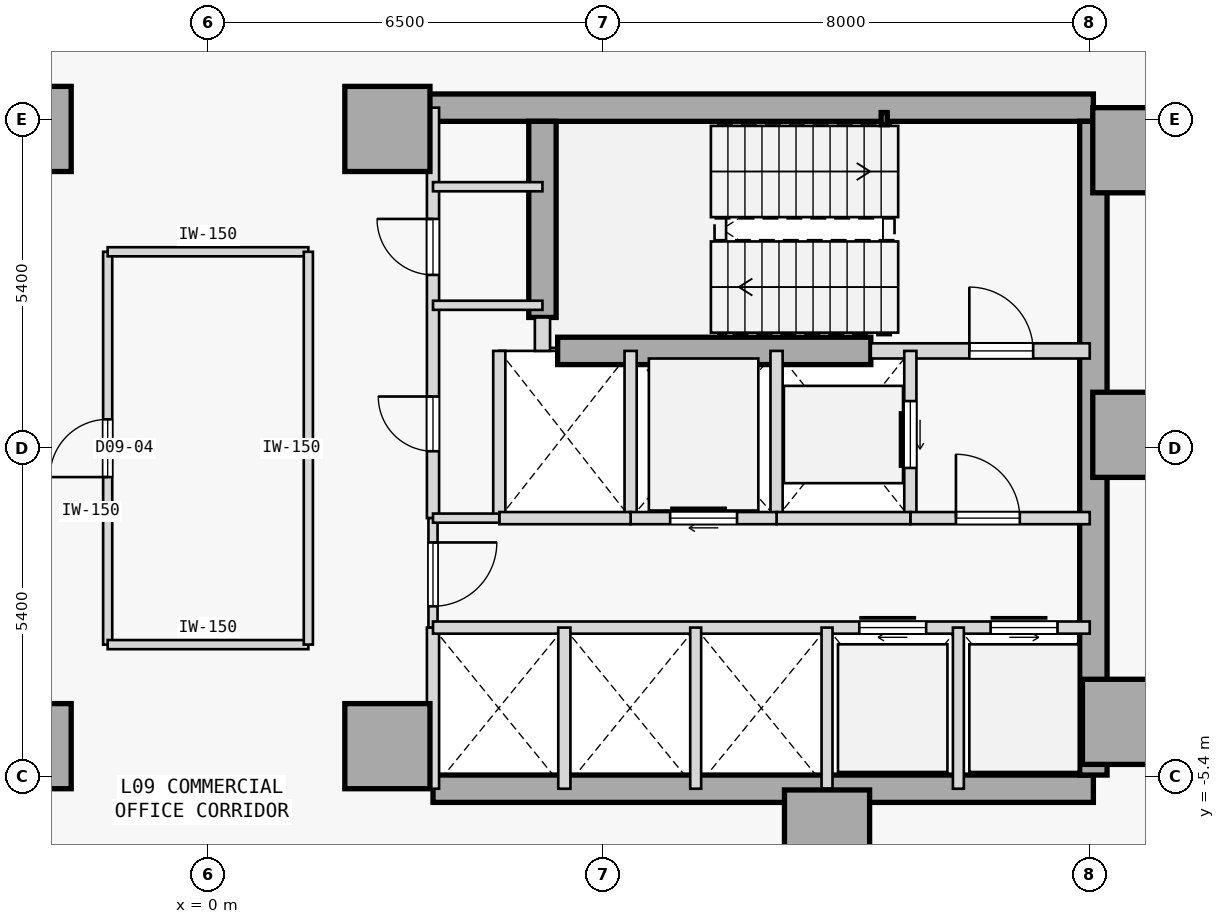
"""IFC4 building model, lengths in metres.
Left out: names, types, materials, properties, quantities, classifications, styles, units other than length and angle.
Written with IfcOpenShell. Run it as: python <this file> out.ifc"""

import sys

from ifc_helpers import new_model, si_unit, direction, frame, frame_2d, origin, origin_2d, place, context, subcontext, project, spatial, rectangle, hollow_rectangle, extrude, element, fill, save


model = new_model("IFC4")
c1 = context("Model", 3, precision=1e-05, world=origin(), true_north=direction((0.0, 1.0)))
c2 = subcontext(c1, "Body", "Model", "MODEL_VIEW")
j1 = project(units=[si_unit("LENGTHUNIT", "METRE"), si_unit("PLANEANGLEUNIT", "RADIAN")], contexts=[c1])
p1 = place(None, origin())
s1 = spatial("IfcSite", under=j1, at=p1, CompositionType="ELEMENT")
p2 = place(p1, origin())
s2 = spatial("IfcBuilding", under=s1, at=p2, CompositionType="ELEMENT")
p3 = place(p2, frame((0.0, 0.0, 40.8)))
s3 = spatial("IfcBuildingStorey", under=s2, at=p3, CompositionType="ELEMENT", Elevation=40.8)
for number, where, z_axis, x_axis in (
    (1, (-2.95, -4.9, 0.0), (0.0, 0.0, 1.0), (1.0, 0.0, 0.0)),
    (2, (-2.95, 5.25, 0.0), (0.0, 0.0, 1.0), (1.0, 0.0, 0.0)),
    (3, (15.25, 4.9, 0.0), (0.0, 0.0, 1.0), (1.0, 0.0, 0.0)),
    (4, (15.25, 0.22, 0.0), (0.0, 0.0, 1.0), (1.0, 0.0, 0.0)),
    (5, (15.08, -4.5, 0.0), (0.0, 0.0, 1.0), (1.0, 0.0, 0.0)),
    (6, (10.18, -6.32, 0.0), (0.0, 0.0, 1.0), (1.0, 0.0, 0.0)),
    (7, (2.95, -4.9, 0.0), (0.0, 0.0, 1.0), (1.0, 0.0, 0.0)),
    (8, (2.95, 5.25, 0.0), (0.0, 0.0, 1.0), (1.0, 0.0, 0.0)),
):
    element("IfcColumn", number, at=place(p3, frame(where, z_axis=z_axis, x_axis=x_axis)), inside=s3, PredefinedType="COLUMN", context=c2, shape_type="SweptSolid", body=[
        extrude(rectangle(XDim=1.4, YDim=1.4, at=origin_2d()), origin(), (0.0, 0.0, 1.0), 3.8),
    ])
p4 = place(p3, frame((3.15, 5.6, 0.0), z_axis=(0.0, 0.0, 1.0), x_axis=(1.0, 0.0, 0.0)))
e9 = element("IfcWall", 9, at=p4, inside=s3, PredefinedType="SHEAR", context=c2, shape_type="SweptSolid", body=[
    extrude(rectangle(XDim=11.41, YDim=0.45, at=frame_2d((5.705, 0.0))), origin(), (0.0, 0.0, 1.0), 3.575),
])
p5 = place(p3, frame((3.7, -5.6, 0.0), z_axis=(0.0, 0.0, 1.0), x_axis=(1.0, 0.0, 0.0)))
e10 = element("IfcWall", 10, at=p5, inside=s3, PredefinedType="SHEAR", context=c2, shape_type="SweptSolid", body=[
    extrude(rectangle(XDim=10.86, YDim=0.45, at=frame_2d((5.43, 0.0))), origin(), (0.0, 0.0, 1.0), 3.575),
])
p6 = place(p3, frame((14.56, -5.375, 0.0), z_axis=(0.0, 0.0, 1.0), x_axis=(0.0, 1.0, 0.0)))
e11 = element("IfcWall", 11, at=p6, inside=s3, PredefinedType="SHEAR", context=c2, shape_type="SweptSolid", body=[
    extrude(rectangle(XDim=10.75, YDim=0.45, at=frame_2d((5.375, 0.0))), origin(), (0.0, 0.0, 1.0), 3.575),
])
p7 = place(p3, frame((5.5, 2.15, 0.0), z_axis=(0.0, 0.0, 1.0), x_axis=(0.0, 1.0, 0.0)))
e12 = element("IfcWall", 12, at=p7, inside=s3, PredefinedType="SHEAR", context=c2, shape_type="SweptSolid", body=[
    extrude(rectangle(XDim=3.225, YDim=0.45, at=frame_2d((1.613, 0.0))), origin(), (0.0, 0.0, 1.0), 3.575),
])
p8 = place(p3, frame((5.75, 1.6, 0.0), z_axis=(0.0, 0.0, 1.0), x_axis=(1.0, 0.0, 0.0)))
e13 = element("IfcWall", 13, at=p8, inside=s3, PredefinedType="SHEAR", context=c2, shape_type="SweptSolid", body=[
    extrude(rectangle(XDim=5.15, YDim=0.45, at=frame_2d((2.575, 0.0))), origin(), (0.0, 0.0, 1.0), 3.575),
])
p9 = place(p3, frame((11.12, 5.42, 0.0), z_axis=(0.0, 0.0, 1.0), x_axis=(1.0, 0.0, 0.0)))
e14 = element("IfcColumn", 14, at=p9, inside=s3, PredefinedType="COLUMN", context=c2, shape_type="SweptSolid", body=[
    extrude(hollow_rectangle(XDim=0.1, YDim=0.2, WallThickness=0.008, at=origin_2d()), origin(), (0.0, 0.0, 1.0), 3.8),
])
p10 = place(p3, frame((10.9, 1.6, 0.0), z_axis=(0.0, 0.0, 1.0), x_axis=(1.0, 0.0, 0.0)))
e15 = element("IfcWall", 15, at=p10, inside=s3, PredefinedType="STANDARD", context=c2, shape_type="SweptSolid", body=[
    extrude(rectangle(XDim=3.6, YDim=0.25, at=frame_2d((1.8, 0.0))), origin(), (0.0, 0.0, 1.0), 3.575),
])
p11 = place(p10, frame((1.62, 0.0, 0.0)))
e16 = element("IfcOpeningElement", 16, at=p11, cuts=e15, PredefinedType="OPENING", context=c2, shape_type="SweptSolid", body=[
    extrude(rectangle(XDim=1.05, YDim=2.15, at=frame_2d((0.525, 1.075))), frame((0.0, 0.135, 0.0), z_axis=(0.0, -1.0, 0.0), x_axis=(1.0, 0.0, 0.0)), (0.0, 0.0, 1.0), 0.27),
])
p12 = place(p3, frame((5.5, 1.6, 0.0), z_axis=(0.0, 0.0, 1.0), x_axis=(0.0, 1.0, 0.0)))
e17 = element("IfcWall", 17, at=p12, inside=s3, PredefinedType="STANDARD", context=c2, shape_type="SweptSolid", body=[
    extrude(rectangle(XDim=0.55, YDim=0.25, at=frame_2d((0.275, 0.0))), origin(), (0.0, 0.0, 1.0), 3.575),
])
p13 = place(p3, frame((3.7, -1.15, 0.0), z_axis=(0.0, 0.0, 1.0), x_axis=(0.0, 1.0, 0.0)))
e18 = element("IfcWall", 18, at=p13, inside=s3, PredefinedType="STANDARD", context=c2, shape_type="SweptSolid", body=[
    extrude(rectangle(XDim=6.75, YDim=0.2, at=frame_2d((3.375, 0.0))), origin(), (0.0, 0.0, 1.0), 3.575),
])
p14 = place(p13, frame((1.1, 0.0, 0.0)))
e19 = element("IfcOpeningElement", 19, at=p14, cuts=e18, PredefinedType="OPENING", context=c2, shape_type="SweptSolid", body=[
    extrude(rectangle(XDim=0.9, YDim=2.15, at=frame_2d((0.45, 1.075))), frame((0.0, 0.11, 0.0), z_axis=(0.0, -1.0, 0.0), x_axis=(1.0, 0.0, 0.0)), (0.0, 0.0, 1.0), 0.22),
])
p15 = place(p13, frame((4.0, 0.0, 0.0)))
e20 = element("IfcOpeningElement", 20, at=p15, cuts=e18, PredefinedType="OPENING", context=c2, shape_type="SweptSolid", body=[
    extrude(rectangle(XDim=0.92, YDim=2.15, at=frame_2d((0.46, 1.075))), frame((0.0, 0.11, 0.0), z_axis=(0.0, -1.0, 0.0), x_axis=(1.0, 0.0, 0.0)), (0.0, 0.0, 1.0), 0.22),
])
p16 = place(p3, frame((3.7, -2.95, 0.0), z_axis=(0.0, 0.0, 1.0), x_axis=(0.0, 1.0, 0.0)))
e21 = element("IfcWall", 21, at=p16, inside=s3, PredefinedType="PARTITIONING", context=c2, shape_type="SweptSolid", body=[
    extrude(rectangle(XDim=1.8, YDim=0.15, at=frame_2d((0.9, 0.0))), origin(), (0.0, 0.0, 1.0), 3.575),
])
p17 = place(p16, frame((0.35, 0.0, 0.0)))
e22 = element("IfcOpeningElement", 22, at=p17, cuts=e21, PredefinedType="OPENING", context=c2, shape_type="SweptSolid", body=[
    extrude(rectangle(XDim=1.05, YDim=2.18, at=frame_2d((0.525, 1.09))), frame((0.0, 0.085, 0.0), z_axis=(0.0, -1.0, 0.0), x_axis=(1.0, 0.0, 0.0)), (0.0, 0.0, 1.0), 0.17),
])
p18 = place(p3, frame((3.7, -5.6, 0.0), z_axis=(0.0, 0.0, 1.0), x_axis=(0.0, 1.0, 0.0)))
e23 = element("IfcWall", 23, at=p18, inside=s3, PredefinedType="STANDARD", context=c2, shape_type="SweptSolid", body=[
    extrude(rectangle(XDim=2.65, YDim=0.2, at=frame_2d((1.325, 0.0))), origin(), (0.0, 0.0, 1.0), 3.575),
])
p19 = place(p3, frame((11.55, -1.15, 0.0), z_axis=(0.0, 0.0, 1.0), x_axis=(0.0, 1.0, 0.0)))
e24 = element("IfcWall", 24, at=p19, inside=s3, PredefinedType="STANDARD", context=c2, shape_type="SweptSolid", body=[
    extrude(rectangle(XDim=2.75, YDim=0.2, at=frame_2d((1.375, 0.0))), origin(), (0.0, 0.0, 1.0), 3.575),
])
p20 = place(p19, frame((0.825, 0.0, 0.0)))
e25 = element("IfcOpeningElement", 25, at=p20, cuts=e24, PredefinedType="OPENING", context=c2, shape_type="SweptSolid", body=[
    extrude(rectangle(XDim=1.1, YDim=2.15, at=frame_2d((0.55, 1.075))), frame((0.0, 0.11, 0.0), z_axis=(0.0, -1.0, 0.0), x_axis=(1.0, 0.0, 0.0)), (0.0, 0.0, 1.0), 0.22),
])
p21 = place(p3, frame((9.35, -1.15, 0.0), z_axis=(0.0, 0.0, 1.0), x_axis=(0.0, 1.0, 0.0)))
e26 = element("IfcWall", 26, at=p21, inside=s3, PredefinedType="STANDARD", context=c2, shape_type="SweptSolid", body=[
    extrude(rectangle(XDim=2.75, YDim=0.2, at=frame_2d((1.375, 0.0))), origin(), (0.0, 0.0, 1.0), 3.575),
])
p22 = place(p3, frame((11.55, -1.15, 0.0), z_axis=(0.0, 0.0, 1.0), x_axis=(1.0, 0.0, 0.0)))
e27 = element("IfcWall", 27, at=p22, inside=s3, PredefinedType="STANDARD", context=c2, shape_type="SweptSolid", body=[
    extrude(rectangle(XDim=2.95, YDim=0.2, at=frame_2d((1.475, 0.0))), origin(), (0.0, 0.0, 1.0), 3.575),
])
p23 = place(p22, frame((0.75, 0.0, 0.0)))
e28 = element("IfcOpeningElement", 28, at=p23, cuts=e27, PredefinedType="OPENING", context=c2, shape_type="SweptSolid", body=[
    extrude(rectangle(XDim=1.05, YDim=2.18, at=frame_2d((0.525, 1.09))), frame((0.0, 0.11, 0.0), z_axis=(0.0, -1.0, 0.0), x_axis=(1.0, 0.0, 0.0)), (0.0, 0.0, 1.0), 0.22),
])
p24 = place(p3, frame((9.35, -1.15, 0.0), z_axis=(0.0, 0.0, 1.0), x_axis=(1.0, 0.0, 0.0)))
e29 = element("IfcWall", 29, at=p24, inside=s3, PredefinedType="STANDARD", context=c2, shape_type="SweptSolid", body=[
    extrude(rectangle(XDim=2.2, YDim=0.2, at=frame_2d((1.1, 0.0))), origin(), (0.0, 0.0, 1.0), 3.575),
])
p25 = place(p3, frame((6.95, -1.15, 0.0), z_axis=(0.0, 0.0, 1.0), x_axis=(0.0, 1.0, 0.0)))
e30 = element("IfcWall", 30, at=p25, inside=s3, PredefinedType="STANDARD", context=c2, shape_type="SweptSolid", body=[
    extrude(rectangle(XDim=2.75, YDim=0.2, at=frame_2d((1.375, 0.0))), origin(), (0.0, 0.0, 1.0), 3.575),
])
p26 = place(p3, frame((6.95, -1.15, 0.0), z_axis=(0.0, 0.0, 1.0), x_axis=(1.0, 0.0, 0.0)))
e31 = element("IfcWall", 31, at=p26, inside=s3, PredefinedType="STANDARD", context=c2, shape_type="SweptSolid", body=[
    extrude(rectangle(XDim=2.4, YDim=0.2, at=frame_2d((1.2, 0.0))), origin(), (0.0, 0.0, 1.0), 3.575),
])
p27 = place(p26, frame((0.65, 0.0, 0.0)))
e32 = element("IfcOpeningElement", 32, at=p27, cuts=e31, PredefinedType="OPENING", context=c2, shape_type="SweptSolid", body=[
    extrude(rectangle(XDim=1.1, YDim=2.15, at=frame_2d((0.55, 1.075))), frame((0.0, 0.11, 0.0), z_axis=(0.0, -1.0, 0.0), x_axis=(1.0, 0.0, 0.0)), (0.0, 0.0, 1.0), 0.22),
])
p28 = place(p3, frame((4.79, -1.15, 0.0), z_axis=(0.0, 0.0, 1.0), x_axis=(0.0, 1.0, 0.0)))
e33 = element("IfcWall", 33, at=p28, inside=s3, PredefinedType="STANDARD", context=c2, shape_type="SweptSolid", body=[
    extrude(rectangle(XDim=2.75, YDim=0.2, at=frame_2d((1.375, 0.0))), origin(), (0.0, 0.0, 1.0), 3.575),
])
p29 = place(p3, frame((4.79, -1.15, 0.0), z_axis=(0.0, 0.0, 1.0), x_axis=(1.0, 0.0, 0.0)))
e34 = element("IfcWall", 34, at=p29, inside=s3, PredefinedType="STANDARD", context=c2, shape_type="SweptSolid", body=[
    extrude(rectangle(XDim=2.16, YDim=0.2, at=frame_2d((1.08, 0.0))), origin(), (0.0, 0.0, 1.0), 3.575),
])
p30 = place(p3, frame((3.7, -1.15, 0.0), z_axis=(0.0, 0.0, 1.0), x_axis=(1.0, 0.0, 0.0)))
e35 = element("IfcWall", 35, at=p30, inside=s3, PredefinedType="PARTITIONING", context=c2, shape_type="SweptSolid", body=[
    extrude(rectangle(XDim=1.09, YDim=0.15, at=frame_2d((0.545, 0.0))), origin(), (0.0, 0.0, 1.0), 3.575),
])
p31 = place(p3, frame((3.7, -2.95, 0.0), z_axis=(0.0, 0.0, 1.0), x_axis=(1.0, 0.0, 0.0)))
e36 = element("IfcWall", 36, at=p31, inside=s3, PredefinedType="STANDARD", context=c2, shape_type="SweptSolid", body=[
    extrude(rectangle(XDim=10.8, YDim=0.2, at=frame_2d((5.4, 0.0))), origin(), (0.0, 0.0, 1.0), 3.575),
])
p32 = place(p31, frame((7.01, 0.0, 0.0)))
e37 = element("IfcOpeningElement", 37, at=p32, cuts=e36, PredefinedType="OPENING", context=c2, shape_type="SweptSolid", body=[
    extrude(rectangle(XDim=1.1, YDim=2.15, at=frame_2d((0.55, 1.075))), frame((0.0, 0.11, 0.0), z_axis=(0.0, -1.0, 0.0), x_axis=(1.0, 0.0, 0.0)), (0.0, 0.0, 1.0), 0.22),
])
p33 = place(p31, frame((9.17, 0.0, 0.0)))
e38 = element("IfcOpeningElement", 38, at=p33, cuts=e36, PredefinedType="OPENING", context=c2, shape_type="SweptSolid", body=[
    extrude(rectangle(XDim=1.1, YDim=2.15, at=frame_2d((0.55, 1.075))), frame((0.0, 0.11, 0.0), z_axis=(0.0, -1.0, 0.0), x_axis=(1.0, 0.0, 0.0)), (0.0, 0.0, 1.0), 0.22),
])
p34 = place(p3, frame((5.86, -5.6, 0.0), z_axis=(0.0, 0.0, 1.0), x_axis=(0.0, 1.0, 0.0)))
e39 = element("IfcWall", 39, at=p34, inside=s3, PredefinedType="STANDARD", context=c2, shape_type="SweptSolid", body=[
    extrude(rectangle(XDim=2.65, YDim=0.2, at=frame_2d((1.325, 0.0))), origin(), (0.0, 0.0, 1.0), 3.575),
])
for number, where, z_axis, x_axis in (
    (40, (12.34, -5.6, 0.0), (0.0, 0.0, 1.0), (0.0, 1.0, 0.0)),
    (41, (10.18, -5.6, 0.0), (0.0, 0.0, 1.0), (0.0, 1.0, 0.0)),
    (42, (8.02, -5.6, 0.0), (0.0, 0.0, 1.0), (0.0, 1.0, 0.0)),
):
    element("IfcWall", number, at=place(p3, frame(where, z_axis=z_axis, x_axis=x_axis)), inside=s3, PredefinedType="STANDARD", context=c2, shape_type="SweptSolid", body=[
        extrude(rectangle(XDim=2.65, YDim=0.18, at=frame_2d((1.325, 0.0))), origin(), (0.0, 0.0, 1.0), 3.575),
    ])
for number, where, z_axis, x_axis in (
    (43, (3.7, 4.3, 0.0), (0.0, 0.0, 1.0), (1.0, 0.0, 0.0)),
    (44, (3.7, 2.35, 0.0), (0.0, 0.0, 1.0), (1.0, 0.0, 0.0)),
):
    element("IfcWall", number, at=place(p3, frame(where, z_axis=z_axis, x_axis=x_axis)), inside=s3, PredefinedType="PARTITIONING", context=c2, shape_type="SweptSolid", body=[
        extrude(rectangle(XDim=1.8, YDim=0.15, at=frame_2d((0.9, 0.0))), origin(), (0.0, 0.0, 1.0), 3.575),
    ])
p35 = place(p3, frame((-1.65, -3.23, 0.0), z_axis=(0.0, 0.0, 1.0), x_axis=(0.0, 1.0, 0.0)))
e45 = element("IfcWall", 45, at=p35, inside=s3, PredefinedType="PARTITIONING", context=c2, shape_type="SweptSolid", body=[
    extrude(rectangle(XDim=6.46, YDim=0.15, at=frame_2d((3.23, 0.0))), origin(), (0.0, 0.0, 1.0), 3.575),
])
p36 = place(p35, frame((2.755, 0.0, 0.0)))
e46 = element("IfcOpeningElement", 46, at=p36, cuts=e45, PredefinedType="OPENING", context=c2, shape_type="SweptSolid", body=[
    extrude(rectangle(XDim=0.95, YDim=2.15, at=frame_2d((0.475, 1.075))), frame((0.0, 0.085, 0.0), z_axis=(0.0, -1.0, 0.0), x_axis=(1.0, 0.0, 0.0)), (0.0, 0.0, 1.0), 0.17),
])
for number, where, z_axis, x_axis in (
    (47, (-1.65, -3.23, 0.0), (0.0, 0.0, 1.0), (1.0, 0.0, 0.0)),
    (48, (-1.65, 3.23, 0.0), (0.0, 0.0, 1.0), (1.0, 0.0, 0.0)),
):
    element("IfcWall", number, at=place(p3, frame(where, z_axis=z_axis, x_axis=x_axis)), inside=s3, PredefinedType="PARTITIONING", context=c2, shape_type="SweptSolid", body=[
        extrude(rectangle(XDim=3.3, YDim=0.15, at=frame_2d((1.65, 0.0))), origin(), (0.0, 0.0, 1.0), 3.575),
    ])
p37 = place(p3, frame((1.65, -3.23, 0.0), z_axis=(0.0, 0.0, 1.0), x_axis=(0.0, 1.0, 0.0)))
e49 = element("IfcWall", 49, at=p37, inside=s3, PredefinedType="PARTITIONING", context=c2, shape_type="SweptSolid", body=[
    extrude(rectangle(XDim=6.46, YDim=0.15, at=frame_2d((3.23, 0.0))), origin(), (0.0, 0.0, 1.0), 3.575),
])
p38 = place(p11, origin())
e50 = element("IfcDoor", 50, at=p38, inside=s3, OperationType="SINGLE_SWING_LEFT", PredefinedType="DOOR", context=c2, shape_type="SweptSolid", body=[
    extrude(rectangle(XDim=1.05, YDim=2.15, at=frame_2d((0.525, 1.075))), frame((0.0, 0.025, 0.0), z_axis=(0.0, -1.0, 0.0), x_axis=(1.0, 0.0, 0.0)), (0.0, 0.0, 1.0), 0.05),
])
fill(e16, e50)
p39 = place(p23, origin())
e51 = element("IfcDoor", 51, at=p39, inside=s3, OperationType="SINGLE_SWING_LEFT", PredefinedType="DOOR", context=c2, shape_type="SweptSolid", body=[
    extrude(rectangle(XDim=1.05, YDim=2.18, at=frame_2d((0.525, 1.09))), frame((0.0, 0.025, 0.0), z_axis=(0.0, -1.0, 0.0), x_axis=(1.0, 0.0, 0.0)), (0.0, 0.0, 1.0), 0.05),
])
fill(e28, e51)
p40 = place(p17, frame((1.05, 0.0, 0.0), z_axis=(0.0, 0.0, 1.0), x_axis=(-1.0, 0.0, 0.0)))
e52 = element("IfcDoor", 52, at=p40, inside=s3, OperationType="SINGLE_SWING_RIGHT", PredefinedType="DOOR", context=c2, shape_type="SweptSolid", body=[
    extrude(rectangle(XDim=1.05, YDim=2.18, at=frame_2d((0.525, 1.09))), frame((0.0, 0.025, 0.0), z_axis=(0.0, -1.0, 0.0), x_axis=(1.0, 0.0, 0.0)), (0.0, 0.0, 1.0), 0.05),
])
fill(e22, e52)
p41 = place(p20, origin())
e53 = element("IfcDoor", 53, at=p41, inside=s3, OperationType="SLIDING_TO_RIGHT", PredefinedType="DOOR", context=c2, shape_type="SweptSolid", body=[
    extrude(rectangle(XDim=1.1, YDim=2.15, at=frame_2d((0.55, 1.075))), frame((0.0, 0.025, 0.0), z_axis=(0.0, -1.0, 0.0), x_axis=(1.0, 0.0, 0.0)), (0.0, 0.0, 1.0), 0.05),
])
fill(e25, e53)
p42 = place(p27, origin())
e54 = element("IfcDoor", 54, at=p42, inside=s3, OperationType="SLIDING_TO_RIGHT", PredefinedType="DOOR", context=c2, shape_type="SweptSolid", body=[
    extrude(rectangle(XDim=1.1, YDim=2.15, at=frame_2d((0.55, 1.075))), frame((0.0, 0.025, 0.0), z_axis=(0.0, -1.0, 0.0), x_axis=(1.0, 0.0, 0.0)), (0.0, 0.0, 1.0), 0.05),
])
fill(e32, e54)
p43 = place(p32, origin())
e55 = element("IfcDoor", 55, at=p43, inside=s3, OperationType="SLIDING_TO_RIGHT", PredefinedType="DOOR", context=c2, shape_type="SweptSolid", body=[
    extrude(rectangle(XDim=1.1, YDim=2.15, at=frame_2d((0.55, 1.075))), frame((0.0, 0.025, 0.0), z_axis=(0.0, -1.0, 0.0), x_axis=(1.0, 0.0, 0.0)), (0.0, 0.0, 1.0), 0.05),
])
fill(e37, e55)
p44 = place(p33, origin())
e56 = element("IfcDoor", 56, at=p44, inside=s3, OperationType="SLIDING_TO_LEFT", PredefinedType="DOOR", context=c2, shape_type="SweptSolid", body=[
    extrude(rectangle(XDim=1.1, YDim=2.15, at=frame_2d((0.55, 1.075))), frame((0.0, 0.025, 0.0), z_axis=(0.0, -1.0, 0.0), x_axis=(1.0, 0.0, 0.0)), (0.0, 0.0, 1.0), 0.05),
])
fill(e38, e56)
p45 = place(p14, origin())
e57 = element("IfcDoor", 57, at=p45, inside=s3, OperationType="SINGLE_SWING_RIGHT", PredefinedType="DOOR", context=c2, shape_type="SweptSolid", body=[
    extrude(rectangle(XDim=0.9, YDim=2.15, at=frame_2d((0.45, 1.075))), frame((0.0, 0.025, 0.0), z_axis=(0.0, -1.0, 0.0), x_axis=(1.0, 0.0, 0.0)), (0.0, 0.0, 1.0), 0.05),
])
fill(e19, e57)
p46 = place(p15, origin())
e58 = element("IfcDoor", 58, at=p46, inside=s3, OperationType="SINGLE_SWING_RIGHT", PredefinedType="DOOR", context=c2, shape_type="SweptSolid", body=[
    extrude(rectangle(XDim=0.92, YDim=2.15, at=frame_2d((0.46, 1.075))), frame((0.0, 0.025, 0.0), z_axis=(0.0, -1.0, 0.0), x_axis=(1.0, 0.0, 0.0)), (0.0, 0.0, 1.0), 0.05),
])
fill(e20, e58)
p47 = place(p36, origin())
e59 = element("IfcDoor", 59, at=p47, inside=s3, OperationType="SINGLE_SWING_LEFT", PredefinedType="DOOR", context=c2, shape_type="SweptSolid", body=[
    extrude(rectangle(XDim=0.95, YDim=2.15, at=frame_2d((0.475, 1.075))), frame((0.0, 0.025, 0.0), z_axis=(0.0, -1.0, 0.0), x_axis=(1.0, 0.0, 0.0)), (0.0, 0.0, 1.0), 0.05),
])
fill(e46, e59)
save(model, sys.argv[1])
